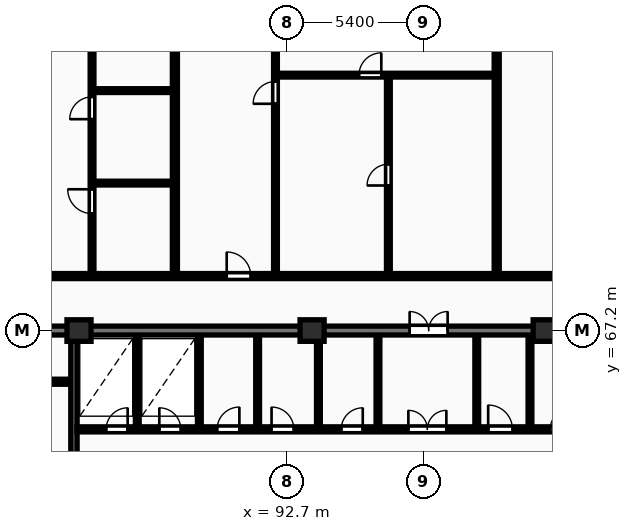
"""IFC4 building model, lengths in metres.
Left out: names, types, materials, properties, quantities, classifications, styles, units other than length and angle.
Written with IfcOpenShell. Run it as: python <this file> out.ifc"""

import sys

from ifc_helpers import new_model, si_unit, direction, frame, frame_2d, origin, origin_2d, place, context, subcontext, project, spatial, rectangle, extrude, element, fill, save


model = new_model("IFC4")
c1 = context("Model", 3, precision=1e-05, world=origin(), true_north=direction((0.0, 1.0)))
c2 = subcontext(c1, "Body", "Model", "MODEL_VIEW")
j1 = project(units=[si_unit("LENGTHUNIT", "METRE"), si_unit("PLANEANGLEUNIT", "RADIAN")], contexts=[c1])
p1 = place(None, origin())
s1 = spatial("IfcSite", under=j1, at=p1, CompositionType="ELEMENT")
p2 = place(p1, origin())
s2 = spatial("IfcBuilding", under=s1, at=p2, CompositionType="ELEMENT")
p3 = place(p2, frame((0.0, 0.0, 80.8)))
s3 = spatial("IfcBuildingStorey", under=s2, at=p3, CompositionType="ELEMENT", Elevation=80.8)
for number, where, z_axis, x_axis in (
    (1, (84.5, 67.2, 0.0), (0.0, 0.0, 1.0), (1.0, 0.0, 0.0)),
    (2, (93.7, 67.2, 0.0), (0.0, 0.0, 1.0), (1.0, 0.0, 0.0)),
    (3, (102.9, 67.2, 0.0), (0.0, 0.0, 1.0), (1.0, 0.0, 0.0)),
):
    element("IfcColumn", number, at=place(p3, frame(where, z_axis=z_axis, x_axis=x_axis)), inside=s3, PredefinedType="COLUMN", context=c2, shape_type="SweptSolid", body=[
        extrude(rectangle(XDim=0.95, YDim=0.85, at=origin_2d()), origin(), (0.0, 0.0, 1.0), 3.25),
    ])
p4 = place(p3, frame((75.95, 67.2, 0.0), z_axis=(0.0, 0.0, 1.0), x_axis=(1.0, 0.0, 0.0)))
e4 = element("IfcWall", 4, at=p4, inside=s3, PredefinedType="SHEAR", context=c2, shape_type="SweptSolid", body=[
    extrude(rectangle(XDim=36.3, YDim=0.35, at=frame_2d((18.15, 0.0))), origin(), (0.0, 0.0, 1.0), 3.25),
])
p5 = place(p4, frame((5.25, 0.0, 0.0)))
e5 = element("IfcOpeningElement", 5, at=p5, cuts=e4, PredefinedType="OPENING", context=c2, shape_type="SweptSolid", body=[
    extrude(rectangle(XDim=1.0, YDim=2.15, at=frame_2d((0.5, 1.075))), frame((0.0, 0.185, 0.0), z_axis=(0.0, -1.0, 0.0), x_axis=(1.0, 0.0, 0.0)), (0.0, 0.0, 1.0), 0.37),
])
p6 = place(p4, frame((21.6, 0.0, 0.0)))
e6 = element("IfcOpeningElement", 6, at=p6, cuts=e4, PredefinedType="OPENING", context=c2, shape_type="SweptSolid", body=[
    extrude(rectangle(XDim=1.5, YDim=2.2, at=frame_2d((0.75, 1.1))), frame((0.0, 0.185, 0.0), z_axis=(0.0, -1.0, 0.0), x_axis=(1.0, 0.0, 0.0)), (0.0, 0.0, 1.0), 0.37),
])
p7 = place(p4, frame((30.45, 0.0, 0.0)))
e7 = element("IfcOpeningElement", 7, at=p7, cuts=e4, PredefinedType="OPENING", context=c2, shape_type="SweptSolid", body=[
    extrude(rectangle(XDim=1.0, YDim=2.15, at=frame_2d((0.5, 1.075))), frame((0.0, 0.185, 0.0), z_axis=(0.0, -1.0, 0.0), x_axis=(1.0, 0.0, 0.0)), (0.0, 0.0, 1.0), 0.37),
])
p8 = place(p3, frame((79.79, 65.18, 0.0), z_axis=(0.0, 0.0, 1.0), x_axis=(1.0, 0.0, 0.0)))
e8 = element("IfcWall", 8, at=p8, inside=s3, PredefinedType="PARTITIONING", context=c2, shape_type="SweptSolid", body=[
    extrude(rectangle(XDim=4.39, YDim=0.2, at=frame_2d((2.195, 0.0))), origin(), (0.0, 0.0, 1.0), 2.97),
])
p9 = place(p8, frame((1.5, 0.0, 0.0)))
e9 = element("IfcOpeningElement", 9, at=p9, cuts=e8, PredefinedType="OPENING", context=c2, shape_type="SweptSolid", body=[
    extrude(rectangle(XDim=1.1, YDim=2.1, at=frame_2d((0.55, 1.05))), frame((0.0, 0.11, 0.0), z_axis=(0.0, -1.0, 0.0), x_axis=(1.0, 0.0, 0.0)), (0.0, 0.0, 1.0), 0.22),
])
p10 = place(p3, frame((84.3, 55.4, 0.0), z_axis=(0.0, 0.0, 1.0), x_axis=(0.0, 1.0, 0.0)))
e10 = element("IfcWall", 10, at=p10, inside=s3, PredefinedType="SHEAR", context=c2, shape_type="SweptSolid", body=[
    extrude(rectangle(XDim=11.6, YDim=0.25, at=frame_2d((5.8, 0.0))), origin(), (0.0, 0.0, 1.0), 3.25),
])
p11 = place(p10, frame((5.2, 0.0, 0.0)))
e11 = element("IfcOpeningElement", 11, at=p11, cuts=e10, PredefinedType="OPENING", context=c2, shape_type="SweptSolid", body=[
    extrude(rectangle(XDim=1.1, YDim=2.1, at=frame_2d((0.55, 1.05))), frame((0.0, 0.135, 0.0), z_axis=(0.0, -1.0, 0.0), x_axis=(1.0, 0.0, 0.0)), (0.0, 0.0, 1.0), 0.27),
])
for number, where, z_axis, x_axis in (
    (12, (86.8, 63.4, 0.0), (0.0, 0.0, 1.0), (0.0, 1.0, 0.0)),
    (13, (89.25, 63.4, 0.0), (0.0, 0.0, 1.0), (0.0, 1.0, 0.0)),
    (14, (91.55, 63.4, 0.0), (0.0, 0.0, 1.0), (0.0, 1.0, 0.0)),
):
    element("IfcWall", number, at=place(p3, frame(where, z_axis=z_axis, x_axis=x_axis)), inside=s3, PredefinedType="PARTITIONING", context=c2, shape_type="SweptSolid", body=[
        extrude(rectangle(XDim=3.6, YDim=0.15, at=frame_2d((1.8, 0.0))), origin(), (0.0, 0.0, 1.0), 2.97),
    ])
p12 = place(p3, frame((93.95, 63.4, 0.0), z_axis=(0.0, 0.0, 1.0), x_axis=(0.0, 1.0, 0.0)))
e15 = element("IfcWall", 15, at=p12, inside=s3, PredefinedType="PARTITIONING", context=c2, shape_type="SweptSolid", body=[
    extrude(rectangle(XDim=3.6, YDim=0.15, at=frame_2d((1.8, 0.0))), origin(), (0.0, 0.0, 1.0), 2.277),
])
for number, where, z_axis, x_axis in (
    (16, (102.3, 63.4, 0.0), (0.0, 0.0, 1.0), (0.0, 1.0, 0.0)),
    (17, (96.3, 63.4, 0.0), (0.0, 0.0, 1.0), (0.0, 1.0, 0.0)),
    (18, (100.2, 63.4, 0.0), (0.0, 0.0, 1.0), (0.0, 1.0, 0.0)),
):
    element("IfcWall", number, at=place(p3, frame(where, z_axis=z_axis, x_axis=x_axis)), inside=s3, PredefinedType="PARTITIONING", context=c2, shape_type="SweptSolid", body=[
        extrude(rectangle(XDim=3.6, YDim=0.15, at=frame_2d((1.8, 0.0))), origin(), (0.0, 0.0, 1.0), 2.97),
    ])
p13 = place(p3, frame((84.42, 63.3, 0.0), z_axis=(0.0, 0.0, 1.0), x_axis=(1.0, 0.0, 0.0)))
e19 = element("IfcWall", 19, at=p13, inside=s3, PredefinedType="PARTITIONING", context=c2, shape_type="SweptSolid", body=[
    extrude(rectangle(XDim=19.83, YDim=0.2, at=frame_2d((9.915, 0.0))), origin(), (0.0, 0.0, 1.0), 2.97),
])
p14 = place(p13, frame((1.15, 0.0, 0.0)))
e20 = element("IfcOpeningElement", 20, at=p14, cuts=e19, PredefinedType="OPENING", context=c2, shape_type="SweptSolid", body=[
    extrude(rectangle(XDim=0.85, YDim=2.05, at=frame_2d((0.425, 1.025))), frame((0.0, 0.11, 0.0), z_axis=(0.0, -1.0, 0.0), x_axis=(1.0, 0.0, 0.0)), (0.0, 0.0, 1.0), 0.22),
])
p15 = place(p13, frame((3.25, 0.0, 0.0)))
e21 = element("IfcOpeningElement", 21, at=p15, cuts=e19, PredefinedType="OPENING", context=c2, shape_type="SweptSolid", body=[
    extrude(rectangle(XDim=0.85, YDim=2.05, at=frame_2d((0.425, 1.025))), frame((0.0, 0.11, 0.0), z_axis=(0.0, -1.0, 0.0), x_axis=(1.0, 0.0, 0.0)), (0.0, 0.0, 1.0), 0.22),
])
p16 = place(p13, frame((13.08, 0.0, 0.0)))
e22 = element("IfcOpeningElement", 22, at=p16, cuts=e19, PredefinedType="OPENING", context=c2, shape_type="SweptSolid", body=[
    extrude(rectangle(XDim=1.5, YDim=2.2, at=frame_2d((0.75, 1.1))), frame((0.0, 0.11, 0.0), z_axis=(0.0, -1.0, 0.0), x_axis=(1.0, 0.0, 0.0)), (0.0, 0.0, 1.0), 0.22),
])
p17 = place(p13, frame((5.53, 0.0, 0.0)))
e23 = element("IfcOpeningElement", 23, at=p17, cuts=e19, PredefinedType="OPENING", context=c2, shape_type="SweptSolid", body=[
    extrude(rectangle(XDim=0.88, YDim=2.06, at=frame_2d((0.44, 1.03))), frame((0.0, 0.11, 0.0), z_axis=(0.0, -1.0, 0.0), x_axis=(1.0, 0.0, 0.0)), (0.0, 0.0, 1.0), 0.22),
])
p18 = place(p13, frame((7.68, 0.0, 0.0)))
e24 = element("IfcOpeningElement", 24, at=p18, cuts=e19, PredefinedType="OPENING", context=c2, shape_type="SweptSolid", body=[
    extrude(rectangle(XDim=0.88, YDim=2.06, at=frame_2d((0.44, 1.03))), frame((0.0, 0.11, 0.0), z_axis=(0.0, -1.0, 0.0), x_axis=(1.0, 0.0, 0.0)), (0.0, 0.0, 1.0), 0.22),
])
p19 = place(p13, frame((10.43, 0.0, 0.0)))
e25 = element("IfcOpeningElement", 25, at=p19, cuts=e19, PredefinedType="OPENING", context=c2, shape_type="SweptSolid", body=[
    extrude(rectangle(XDim=0.85, YDim=2.05, at=frame_2d((0.425, 1.025))), frame((0.0, 0.11, 0.0), z_axis=(0.0, -1.0, 0.0), x_axis=(1.0, 0.0, 0.0)), (0.0, 0.0, 1.0), 0.22),
])
p20 = place(p13, frame((16.23, 0.0, 0.0)))
e26 = element("IfcOpeningElement", 26, at=p20, cuts=e19, PredefinedType="OPENING", context=c2, shape_type="SweptSolid", body=[
    extrude(rectangle(XDim=0.96, YDim=2.1, at=frame_2d((0.48, 1.05))), frame((0.0, 0.11, 0.0), z_axis=(0.0, -1.0, 0.0), x_axis=(1.0, 0.0, 0.0)), (0.0, 0.0, 1.0), 0.22),
])
p21 = place(p13, frame((18.68, 0.0, 0.0)))
e27 = element("IfcOpeningElement", 27, at=p21, cuts=e19, PredefinedType="OPENING", context=c2, shape_type="SweptSolid", body=[
    extrude(rectangle(XDim=0.84, YDim=2.04, at=frame_2d((0.42, 1.02))), frame((0.0, 0.11, 0.0), z_axis=(0.0, -1.0, 0.0), x_axis=(1.0, 0.0, 0.0)), (0.0, 0.0, 1.0), 0.22),
])
p22 = place(p3, frame((88.285, 69.43, 0.0), z_axis=(0.0, 0.0, 1.0), x_axis=(0.0, 1.0, 0.0)))
e28 = element("IfcWall", 28, at=p22, inside=s3, PredefinedType="PARTITIONING", context=c2, shape_type="SweptSolid", body=[
    extrude(rectangle(XDim=26.47, YDim=0.2, at=frame_2d((13.235, 0.0))), origin(), (0.0, 0.0, 1.0), 2.97),
])
for number, where, z_axis, x_axis in (
    (29, (85.075, 73.02, 0.0), (0.0, 0.0, 1.0), (1.0, 0.0, 0.0)),
    (30, (85.075, 76.67, 0.0), (0.0, 0.0, 1.0), (1.0, 0.0, 0.0)),
):
    element("IfcWall", number, at=place(p3, frame(where, z_axis=z_axis, x_axis=x_axis)), inside=s3, PredefinedType="PARTITIONING", context=c2, shape_type="SweptSolid", body=[
        extrude(rectangle(XDim=3.13, YDim=0.15, at=frame_2d((1.565, 0.0))), origin(), (0.0, 0.0, 1.0), 2.97),
    ])
p23 = place(p3, frame((85.015, 69.41, 0.0), z_axis=(0.0, 0.0, 1.0), x_axis=(0.0, 1.0, 0.0)))
e31 = element("IfcWall", 31, at=p23, inside=s3, PredefinedType="PARTITIONING", context=c2, shape_type="SweptSolid", body=[
    extrude(rectangle(XDim=21.18, YDim=0.15, at=frame_2d((10.59, 0.0))), origin(), (0.0, 0.0, 1.0), 2.97),
])
p24 = place(p23, frame((2.406, 0.0, 0.0)))
e32 = element("IfcOpeningElement", 32, at=p24, cuts=e31, PredefinedType="OPENING", context=c2, shape_type="SweptSolid", body=[
    extrude(rectangle(XDim=0.96, YDim=2.1, at=frame_2d((0.48, 1.05))), frame((0.0, 0.085, 0.0), z_axis=(0.0, -1.0, 0.0), x_axis=(1.0, 0.0, 0.0)), (0.0, 0.0, 1.0), 0.17),
])
p25 = place(p23, frame((6.133, 0.0, 0.0)))
e33 = element("IfcOpeningElement", 33, at=p25, cuts=e31, PredefinedType="OPENING", context=c2, shape_type="SweptSolid", body=[
    extrude(rectangle(XDim=0.88, YDim=2.06, at=frame_2d((0.44, 1.03))), frame((0.0, 0.085, 0.0), z_axis=(0.0, -1.0, 0.0), x_axis=(1.0, 0.0, 0.0)), (0.0, 0.0, 1.0), 0.17),
])
p26 = place(p23, frame((12.003, 0.0, 0.0)))
e34 = element("IfcOpeningElement", 34, at=p26, cuts=e31, PredefinedType="OPENING", context=c2, shape_type="SweptSolid", body=[
    extrude(rectangle(XDim=0.84, YDim=2.04, at=frame_2d((0.42, 1.02))), frame((0.0, 0.085, 0.0), z_axis=(0.0, -1.0, 0.0), x_axis=(1.0, 0.0, 0.0)), (0.0, 0.0, 1.0), 0.17),
])
p27 = place(p3, frame((100.987, 69.43, 0.0), z_axis=(0.0, 0.0, 1.0), x_axis=(0.0, 1.0, 0.0)))
e35 = element("IfcWall", 35, at=p27, inside=s3, PredefinedType="PARTITIONING", context=c2, shape_type="SweptSolid", body=[
    extrude(rectangle(XDim=26.47, YDim=0.2, at=frame_2d((13.235, 0.0))), origin(), (0.0, 0.0, 1.0), 2.97),
])
p28 = place(p3, frame((96.711, 69.41, 0.0), z_axis=(0.0, 0.0, 1.0), x_axis=(0.0, 1.0, 0.0)))
e36 = element("IfcWall", 36, at=p28, inside=s3, PredefinedType="PARTITIONING", context=c2, shape_type="SweptSolid", body=[
    extrude(rectangle(XDim=7.87, YDim=0.15, at=frame_2d((3.935, 0.0))), origin(), (0.0, 0.0, 1.0), 2.97),
])
p29 = place(p28, frame((3.515, 0.0, 0.0)))
e37 = element("IfcOpeningElement", 37, at=p29, cuts=e36, PredefinedType="OPENING", context=c2, shape_type="SweptSolid", body=[
    extrude(rectangle(XDim=0.84, YDim=2.04, at=frame_2d((0.42, 1.02))), frame((0.0, 0.085, 0.0), z_axis=(0.0, -1.0, 0.0), x_axis=(1.0, 0.0, 0.0)), (0.0, 0.0, 1.0), 0.17),
])
p30 = place(p3, frame((92.315, 77.28, 0.0), z_axis=(0.0, 0.0, 1.0), x_axis=(1.0, 0.0, 0.0)))
e38 = element("IfcWall", 38, at=p30, inside=s3, PredefinedType="PARTITIONING", context=c2, shape_type="SweptSolid", body=[
    extrude(rectangle(XDim=8.593, YDim=0.15, at=frame_2d((4.296, 0.0))), origin(), (0.0, 0.0, 1.0), 2.97),
])
p31 = place(p30, frame((3.237, 0.0, 0.0)))
e39 = element("IfcOpeningElement", 39, at=p31, cuts=e38, PredefinedType="OPENING", context=c2, shape_type="SweptSolid", body=[
    extrude(rectangle(XDim=0.88, YDim=2.06, at=frame_2d((0.44, 1.03))), frame((0.0, 0.085, 0.0), z_axis=(0.0, -1.0, 0.0), x_axis=(1.0, 0.0, 0.0)), (0.0, 0.0, 1.0), 0.17),
])
p32 = place(p3, frame((92.255, 69.41, 0.0), z_axis=(0.0, 0.0, 1.0), x_axis=(0.0, 1.0, 0.0)))
e40 = element("IfcWall", 40, at=p32, inside=s3, PredefinedType="PARTITIONING", context=c2, shape_type="SweptSolid", body=[
    extrude(rectangle(XDim=16.1, YDim=0.15, at=frame_2d((8.05, 0.0))), origin(), (0.0, 0.0, 1.0), 2.97),
])
p33 = place(p32, frame((6.74, 0.0, 0.0)))
e41 = element("IfcOpeningElement", 41, at=p33, cuts=e40, PredefinedType="OPENING", context=c2, shape_type="SweptSolid", body=[
    extrude(rectangle(XDim=0.88, YDim=2.06, at=frame_2d((0.44, 1.03))), frame((0.0, 0.085, 0.0), z_axis=(0.0, -1.0, 0.0), x_axis=(1.0, 0.0, 0.0)), (0.0, 0.0, 1.0), 0.17),
])
p34 = place(p3, frame((57.6, 69.35, 0.0), z_axis=(0.0, 0.0, 1.0), x_axis=(1.0, 0.0, 0.0)))
e42 = element("IfcWall", 42, at=p34, inside=s3, PredefinedType="PARTITIONING", context=c2, shape_type="SweptSolid", body=[
    extrude(rectangle(XDim=73.0, YDim=0.2, at=frame_2d((36.5, 0.0))), origin(), (0.0, 0.0, 1.0), 2.97),
])
p35 = place(p34, frame((0.37, 0.0, 0.0)))
e43 = element("IfcOpeningElement", 43, at=p35, cuts=e42, PredefinedType="OPENING", context=c2, shape_type="SweptSolid", body=[
    extrude(rectangle(XDim=0.95, YDim=2.15, at=frame_2d((0.475, 1.075))), frame((0.0, 0.11, 0.0), z_axis=(0.0, -1.0, 0.0), x_axis=(1.0, 0.0, 0.0)), (0.0, 0.0, 1.0), 0.22),
])
p36 = place(p34, frame((20.421, 0.0, 0.0)))
e44 = element("IfcOpeningElement", 44, at=p36, cuts=e42, PredefinedType="OPENING", context=c2, shape_type="SweptSolid", body=[
    extrude(rectangle(XDim=1.22, YDim=2.18, at=frame_2d((0.61, 1.09))), frame((0.0, 0.11, 0.0), z_axis=(0.0, -1.0, 0.0), x_axis=(1.0, 0.0, 0.0)), (0.0, 0.0, 1.0), 0.22),
])
p37 = place(p34, frame((32.729, 0.0, 0.0)))
e45 = element("IfcOpeningElement", 45, at=p37, cuts=e42, PredefinedType="OPENING", context=c2, shape_type="SweptSolid", body=[
    extrude(rectangle(XDim=0.95, YDim=2.15, at=frame_2d((0.475, 1.075))), frame((0.0, 0.11, 0.0), z_axis=(0.0, -1.0, 0.0), x_axis=(1.0, 0.0, 0.0)), (0.0, 0.0, 1.0), 0.22),
])
p38 = place(p34, frame((46.157, 0.0, 0.0)))
e46 = element("IfcOpeningElement", 46, at=p38, cuts=e42, PredefinedType="OPENING", context=c2, shape_type="SweptSolid", body=[
    extrude(rectangle(XDim=0.95, YDim=2.15, at=frame_2d((0.475, 1.075))), frame((0.0, 0.11, 0.0), z_axis=(0.0, -1.0, 0.0), x_axis=(1.0, 0.0, 0.0)), (0.0, 0.0, 1.0), 0.22),
])
p39 = place(p34, frame((60.803, 0.0, 0.0)))
e47 = element("IfcOpeningElement", 47, at=p39, cuts=e42, PredefinedType="OPENING", context=c2, shape_type="SweptSolid", body=[
    extrude(rectangle(XDim=0.95, YDim=2.15, at=frame_2d((0.475, 1.075))), frame((0.0, 0.11, 0.0), z_axis=(0.0, -1.0, 0.0), x_axis=(1.0, 0.0, 0.0)), (0.0, 0.0, 1.0), 0.22),
])
p40 = place(p6, origin())
e48 = element("IfcDoor", 48, at=p40, inside=s3, OperationType="DOUBLE_DOOR_SINGLE_SWING", PredefinedType="DOOR", context=c2, shape_type="SweptSolid", body=[
    extrude(rectangle(XDim=1.5, YDim=2.2, at=frame_2d((0.75, 1.1))), frame((0.0, 0.025, 0.0), z_axis=(0.0, -1.0, 0.0), x_axis=(1.0, 0.0, 0.0)), (0.0, 0.0, 1.0), 0.05),
])
fill(e6, e48)
p41 = place(p14, origin())
e49 = element("IfcDoor", 49, at=p41, inside=s3, OperationType="SINGLE_SWING_RIGHT", PredefinedType="DOOR", context=c2, shape_type="SweptSolid", body=[
    extrude(rectangle(XDim=0.85, YDim=2.05, at=frame_2d((0.425, 1.025))), frame((0.0, 0.025, 0.0), z_axis=(0.0, -1.0, 0.0), x_axis=(1.0, 0.0, 0.0)), (0.0, 0.0, 1.0), 0.05),
])
fill(e20, e49)
p42 = place(p15, origin())
e50 = element("IfcDoor", 50, at=p42, inside=s3, OperationType="SINGLE_SWING_LEFT", PredefinedType="DOOR", context=c2, shape_type="SweptSolid", body=[
    extrude(rectangle(XDim=0.85, YDim=2.05, at=frame_2d((0.425, 1.025))), frame((0.0, 0.025, 0.0), z_axis=(0.0, -1.0, 0.0), x_axis=(1.0, 0.0, 0.0)), (0.0, 0.0, 1.0), 0.05),
])
fill(e21, e50)
p43 = place(p16, origin())
e51 = element("IfcDoor", 51, at=p43, inside=s3, OperationType="DOUBLE_DOOR_SINGLE_SWING", PredefinedType="DOOR", context=c2, shape_type="SweptSolid", body=[
    extrude(rectangle(XDim=1.5, YDim=2.2, at=frame_2d((0.75, 1.1))), frame((0.0, 0.025, 0.0), z_axis=(0.0, -1.0, 0.0), x_axis=(1.0, 0.0, 0.0)), (0.0, 0.0, 1.0), 0.05),
])
fill(e22, e51)
p44 = place(p17, origin())
e52 = element("IfcDoor", 52, at=p44, inside=s3, OperationType="SINGLE_SWING_RIGHT", PredefinedType="DOOR", context=c2, shape_type="SweptSolid", body=[
    extrude(rectangle(XDim=0.88, YDim=2.06, at=frame_2d((0.44, 1.03))), frame((0.0, 0.025, 0.0), z_axis=(0.0, -1.0, 0.0), x_axis=(1.0, 0.0, 0.0)), (0.0, 0.0, 1.0), 0.05),
])
fill(e23, e52)
p45 = place(p18, origin())
e53 = element("IfcDoor", 53, at=p45, inside=s3, OperationType="SINGLE_SWING_LEFT", PredefinedType="DOOR", context=c2, shape_type="SweptSolid", body=[
    extrude(rectangle(XDim=0.88, YDim=2.06, at=frame_2d((0.44, 1.03))), frame((0.0, 0.025, 0.0), z_axis=(0.0, -1.0, 0.0), x_axis=(1.0, 0.0, 0.0)), (0.0, 0.0, 1.0), 0.05),
])
fill(e24, e53)
p46 = place(p19, origin())
e54 = element("IfcDoor", 54, at=p46, inside=s3, OperationType="SINGLE_SWING_RIGHT", PredefinedType="DOOR", context=c2, shape_type="SweptSolid", body=[
    extrude(rectangle(XDim=0.85, YDim=2.05, at=frame_2d((0.425, 1.025))), frame((0.0, 0.025, 0.0), z_axis=(0.0, -1.0, 0.0), x_axis=(1.0, 0.0, 0.0)), (0.0, 0.0, 1.0), 0.05),
])
fill(e25, e54)
p47 = place(p20, origin())
e55 = element("IfcDoor", 55, at=p47, inside=s3, OperationType="SINGLE_SWING_LEFT", PredefinedType="DOOR", context=c2, shape_type="SweptSolid", body=[
    extrude(rectangle(XDim=0.96, YDim=2.1, at=frame_2d((0.48, 1.05))), frame((0.0, 0.025, 0.0), z_axis=(0.0, -1.0, 0.0), x_axis=(1.0, 0.0, 0.0)), (0.0, 0.0, 1.0), 0.05),
])
fill(e26, e55)
p48 = place(p21, origin())
e56 = element("IfcDoor", 56, at=p48, inside=s3, OperationType="SINGLE_SWING_RIGHT", PredefinedType="DOOR", context=c2, shape_type="SweptSolid", body=[
    extrude(rectangle(XDim=0.84, YDim=2.04, at=frame_2d((0.42, 1.02))), frame((0.0, 0.025, 0.0), z_axis=(0.0, -1.0, 0.0), x_axis=(1.0, 0.0, 0.0)), (0.0, 0.0, 1.0), 0.05),
])
fill(e27, e56)
p49 = place(p24, origin())
e57 = element("IfcDoor", 57, at=p49, inside=s3, OperationType="SINGLE_SWING_RIGHT", PredefinedType="DOOR", context=c2, shape_type="SweptSolid", body=[
    extrude(rectangle(XDim=0.96, YDim=2.1, at=frame_2d((0.48, 1.05))), frame((0.0, 0.025, 0.0), z_axis=(0.0, -1.0, 0.0), x_axis=(1.0, 0.0, 0.0)), (0.0, 0.0, 1.0), 0.05),
])
fill(e32, e57)
p50 = place(p25, origin())
e58 = element("IfcDoor", 58, at=p50, inside=s3, OperationType="SINGLE_SWING_LEFT", PredefinedType="DOOR", context=c2, shape_type="SweptSolid", body=[
    extrude(rectangle(XDim=0.88, YDim=2.06, at=frame_2d((0.44, 1.03))), frame((0.0, 0.025, 0.0), z_axis=(0.0, -1.0, 0.0), x_axis=(1.0, 0.0, 0.0)), (0.0, 0.0, 1.0), 0.05),
])
fill(e33, e58)
p51 = place(p29, origin())
e59 = element("IfcDoor", 59, at=p51, inside=s3, OperationType="SINGLE_SWING_LEFT", PredefinedType="DOOR", context=c2, shape_type="SweptSolid", body=[
    extrude(rectangle(XDim=0.84, YDim=2.04, at=frame_2d((0.42, 1.02))), frame((0.0, 0.025, 0.0), z_axis=(0.0, -1.0, 0.0), x_axis=(1.0, 0.0, 0.0)), (0.0, 0.0, 1.0), 0.05),
])
fill(e37, e59)
p52 = place(p31, origin())
e60 = element("IfcDoor", 60, at=p52, inside=s3, OperationType="SINGLE_SWING_RIGHT", PredefinedType="DOOR", context=c2, shape_type="SweptSolid", body=[
    extrude(rectangle(XDim=0.88, YDim=2.06, at=frame_2d((0.44, 1.03))), frame((0.0, 0.025, 0.0), z_axis=(0.0, -1.0, 0.0), x_axis=(1.0, 0.0, 0.0)), (0.0, 0.0, 1.0), 0.05),
])
fill(e39, e60)
p53 = place(p33, origin())
e61 = element("IfcDoor", 61, at=p53, inside=s3, OperationType="SINGLE_SWING_LEFT", PredefinedType="DOOR", context=c2, shape_type="SweptSolid", body=[
    extrude(rectangle(XDim=0.88, YDim=2.06, at=frame_2d((0.44, 1.03))), frame((0.0, 0.025, 0.0), z_axis=(0.0, -1.0, 0.0), x_axis=(1.0, 0.0, 0.0)), (0.0, 0.0, 1.0), 0.05),
])
fill(e41, e61)
p54 = place(p37, origin())
e62 = element("IfcDoor", 62, at=p54, inside=s3, OperationType="SINGLE_SWING_LEFT", PredefinedType="DOOR", context=c2, shape_type="SweptSolid", body=[
    extrude(rectangle(XDim=0.95, YDim=2.15, at=frame_2d((0.475, 1.075))), frame((0.0, 0.025, 0.0), z_axis=(0.0, -1.0, 0.0), x_axis=(1.0, 0.0, 0.0)), (0.0, 0.0, 1.0), 0.05),
])
fill(e45, e62)
save(model, sys.argv[1])
